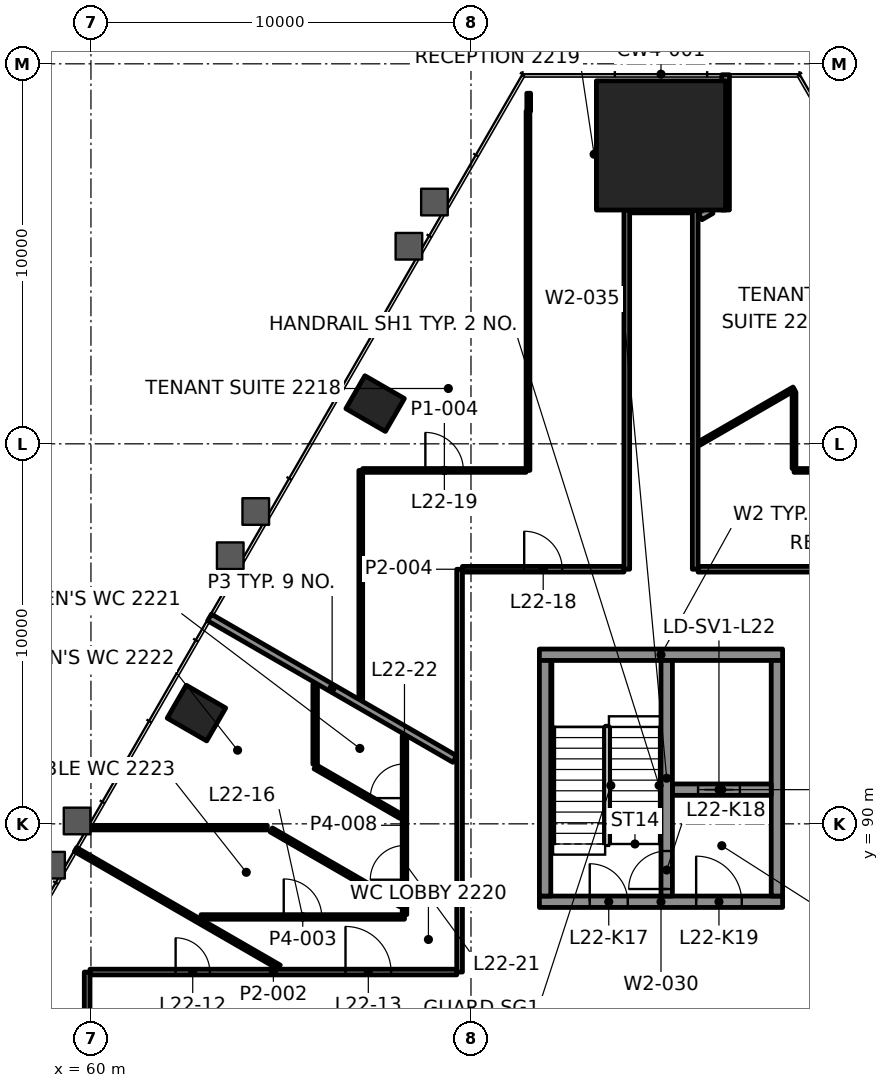
"""IFC4 building model, lengths in metres.
Left out: names, types, materials, properties, quantities, classifications, styles, units other than length and angle.
Written with IfcOpenShell. Run it as: python <this file> out.ifc"""

import sys

from ifc_helpers import new_model, si_unit, direction, frame, frame_2d, origin, origin_2d, place, context, subcontext, project, spatial, rectangle, extrude, element, fill, save


model = new_model("IFC4")
c1 = context("Model", 3, precision=1e-05, world=origin(), true_north=direction((0.0, 1.0)))
c2 = subcontext(c1, "Body", "Model", "MODEL_VIEW")
j1 = project(units=[si_unit("LENGTHUNIT", "METRE"), si_unit("PLANEANGLEUNIT", "RADIAN")], contexts=[c1])
p1 = place(None, origin())
s1 = spatial("IfcSite", under=j1, at=p1, CompositionType="ELEMENT")
p2 = place(p1, origin())
s2 = spatial("IfcBuilding", under=s1, at=p2, CompositionType="ELEMENT")
p3 = place(p2, frame((0.0, 0.0, 98.8)))
s3 = spatial("IfcBuildingStorey", under=s2, at=p3, CompositionType="ELEMENT", Elevation=98.8)
p4 = place(p3, frame((75.0, 107.853, 0.0), z_axis=(0.0, 0.0, 1.0), x_axis=(-1.0, 0.0, 0.0)))
e1 = element("IfcColumn", 1, at=p4, inside=s3, PredefinedType="COLUMN", context=c2, shape_type="SweptSolid", body=[
    extrude(rectangle(XDim=3.4, YDim=3.4, at=origin_2d()), origin(), (0.0, 0.0, 1.0), 4.2),
])
for number, where, z_axis, x_axis in (
    (2, (67.478, 101.059, -0.0), (0.0, 0.0, 1.0), (-0.5, -0.866, 0.0)),
    (3, (62.776, 92.916, -0.0), (0.0, 0.0, 1.0), (-0.5, -0.866, 0.0)),
):
    element("IfcColumn", number, at=place(p3, frame(where, z_axis=z_axis, x_axis=x_axis)), inside=s3, PredefinedType="COLUMN", context=c2, shape_type="SweptSolid", body=[
        extrude(rectangle(XDim=1.0, YDim=1.2, at=origin_2d()), origin(), (0.0, 0.0, 1.0), 4.2),
    ])
p5 = place(p3, frame((71.8, 87.95, 0.0), z_axis=(0.0, 0.0, 1.0), x_axis=(1.0, 0.0, 0.0)))
e4 = element("IfcWall", 4, at=p5, inside=s3, PredefinedType="SHEAR", context=c2, shape_type="SweptSolid", body=[
    extrude(rectangle(XDim=6.4, YDim=0.3, at=frame_2d((3.2, 0.0))), origin(), (0.0, 0.0, 1.0), 4.0),
])
p6 = place(p5, frame((1.325, 0.0, 0.0)))
e5 = element("IfcOpeningElement", 5, at=p6, cuts=e4, PredefinedType="OPENING", context=c2, shape_type="SweptSolid", body=[
    extrude(rectangle(XDim=1.0, YDim=2.1, at=frame_2d((0.5, 1.05))), frame((0.0, 0.16, 0.0), z_axis=(0.0, -1.0, 0.0), x_axis=(1.0, 0.0, 0.0)), (0.0, 0.0, 1.0), 0.32),
])
p7 = place(p5, frame((4.125, 0.0, 0.0)))
e6 = element("IfcOpeningElement", 6, at=p7, cuts=e4, PredefinedType="OPENING", context=c2, shape_type="SweptSolid", body=[
    extrude(rectangle(XDim=1.2, YDim=2.1, at=frame_2d((0.6, 1.05))), frame((0.0, 0.16, 0.0), z_axis=(0.0, -1.0, 0.0), x_axis=(1.0, 0.0, 0.0)), (0.0, 0.0, 1.0), 0.32),
])
p8 = place(p3, frame((71.8, 94.45, 0.0), z_axis=(0.0, 0.0, 1.0), x_axis=(1.0, 0.0, 0.0)))
e7 = element("IfcWall", 7, at=p8, inside=s3, PredefinedType="SHEAR", context=c2, shape_type="SweptSolid", body=[
    extrude(rectangle(XDim=6.4, YDim=0.3, at=frame_2d((3.2, 0.0))), origin(), (0.0, 0.0, 1.0), 4.0),
])
for number, where, z_axis, x_axis in (
    (8, (71.95, 88.1, 0.0), (0.0, 0.0, 1.0), (0.0, 1.0, 0.0)),
    (9, (78.05, 88.1, 0.0), (0.0, 0.0, 1.0), (0.0, 1.0, 0.0)),
):
    element("IfcWall", number, at=place(p3, frame(where, z_axis=z_axis, x_axis=x_axis)), inside=s3, PredefinedType="SHEAR", context=c2, shape_type="SweptSolid", body=[
        extrude(rectangle(XDim=6.2, YDim=0.3, at=frame_2d((3.1, 0.0))), origin(), (0.0, 0.0, 1.0), 4.0),
    ])
p9 = place(p3, frame((75.3, 90.9, 0.0), z_axis=(0.0, 0.0, 1.0), x_axis=(1.0, 0.0, 0.0)))
e10 = element("IfcWall", 10, at=p9, inside=s3, PredefinedType="SHEAR", context=c2, shape_type="SweptSolid", body=[
    extrude(rectangle(XDim=2.6, YDim=0.3, at=frame_2d((1.3, 0.0))), origin(), (0.0, 0.0, 1.0), 4.0),
])
p10 = place(p9, frame((0.675, 0.0, 0.0)))
e11 = element("IfcOpeningElement", 11, at=p10, cuts=e10, PredefinedType="OPENING", context=c2, shape_type="SweptSolid", body=[
    extrude(rectangle(XDim=1.1, YDim=2.1, at=frame_2d((0.55, 1.05))), frame((0.0, 0.16, 0.0), z_axis=(0.0, -1.0, 0.0), x_axis=(1.0, 0.0, 0.0)), (0.0, 0.0, 1.0), 0.32),
])
p11 = place(p3, frame((75.15, 88.1, 0.0), z_axis=(0.0, 0.0, 1.0), x_axis=(0.0, 1.0, 0.0)))
e12 = element("IfcWall", 12, at=p11, inside=s3, PredefinedType="SHEAR", context=c2, shape_type="SweptSolid", body=[
    extrude(rectangle(XDim=6.2, YDim=0.3, at=frame_2d((3.1, 0.0))), origin(), (0.0, 0.0, 1.0), 4.0),
])
p12 = place(p11, frame((0.185, 0.0, 0.0)))
e13 = element("IfcOpeningElement", 13, at=p12, cuts=e12, PredefinedType="OPENING", context=c2, shape_type="SweptSolid", body=[
    extrude(rectangle(XDim=1.0, YDim=2.1, at=frame_2d((0.5, 1.05))), frame((0.0, 0.16, 0.0), z_axis=(0.0, -1.0, 0.0), x_axis=(1.0, 0.0, 0.0)), (0.0, 0.0, 1.0), 0.32),
])
p13 = place(p3, frame((59.976, 86.1, 0.0), z_axis=(0.0, 0.0, 1.0), x_axis=(1.0, 0.0, 0.0)))
e14 = element("IfcWall", 14, at=p13, inside=s3, PredefinedType="PARTITIONING", context=c2, shape_type="SweptSolid", body=[
    extrude(rectangle(XDim=9.649, YDim=0.15, at=frame_2d((4.825, 0.0))), origin(), (0.0, 0.0, 1.0), 3.4),
])
p14 = place(p13, frame((2.252, 0.0, 0.0)))
e15 = element("IfcOpeningElement", 15, at=p14, cuts=e14, PredefinedType="OPENING", context=c2, shape_type="SweptSolid", body=[
    extrude(rectangle(XDim=0.9, YDim=2.1, at=frame_2d((0.45, 1.05))), frame((0.0, 0.085, 0.0), z_axis=(0.0, -1.0, 0.0), x_axis=(1.0, 0.0, 0.0)), (0.0, 0.0, 1.0), 0.17),
])
p15 = place(p13, frame((6.723, 0.0, 0.0)))
e16 = element("IfcOpeningElement", 16, at=p15, cuts=e14, PredefinedType="OPENING", context=c2, shape_type="SweptSolid", body=[
    extrude(rectangle(XDim=1.2, YDim=2.1, at=frame_2d((0.6, 1.05))), frame((0.0, 0.085, 0.0), z_axis=(0.0, -1.0, 0.0), x_axis=(1.0, 0.0, 0.0)), (0.0, 0.0, 1.0), 0.17),
])
p16 = place(p3, frame((62.896, 87.55, 0.0), z_axis=(0.0, 0.0, 1.0), x_axis=(1.0, 0.0, 0.0)))
e17 = element("IfcWall", 17, at=p16, inside=s3, PredefinedType="PARTITIONING", context=c2, shape_type="SweptSolid", body=[
    extrude(rectangle(XDim=5.354, YDim=0.12, at=frame_2d((2.677, 0.0))), origin(), (0.0, 0.0, 1.0), 3.4),
])
p17 = place(p16, frame((2.177, 0.0, 0.0)))
e18 = element("IfcOpeningElement", 18, at=p17, cuts=e17, PredefinedType="OPENING", context=c2, shape_type="SweptSolid", body=[
    extrude(rectangle(XDim=1.0, YDim=2.1, at=frame_2d((0.5, 1.05))), frame((0.0, 0.07, 0.0), z_axis=(0.0, -1.0, 0.0), x_axis=(1.0, 0.0, 0.0)), (0.0, 0.0, 1.0), 0.14),
])
p18 = place(p3, frame((59.927, 89.9, 0.0), z_axis=(0.0, 0.0, 1.0), x_axis=(1.0, 0.0, 0.0)))
e19 = element("IfcWall", 19, at=p18, inside=s3, PredefinedType="PARTITIONING", context=c2, shape_type="SweptSolid", body=[
    extrude(rectangle(XDim=4.714, YDim=0.12, at=frame_2d((2.357, 0.0))), origin(), (0.0, 0.0, 1.0), 3.165),
])
p19 = place(p3, frame((69.775, 96.7, 0.0), z_axis=(0.0, 0.0, 1.0), x_axis=(1.0, 0.0, 0.0)))
e20 = element("IfcWall", 20, at=p19, inside=s3, PredefinedType="PARTITIONING", context=c2, shape_type="SweptSolid", body=[
    extrude(rectangle(XDim=4.25, YDim=0.15, at=frame_2d((2.125, 0.0))), origin(), (0.0, 0.0, 1.0), 3.4),
])
p20 = place(p19, frame((1.625, 0.0, 0.0)))
e21 = element("IfcOpeningElement", 21, at=p20, cuts=e20, PredefinedType="OPENING", context=c2, shape_type="SweptSolid", body=[
    extrude(rectangle(XDim=1.0, YDim=2.1, at=frame_2d((0.5, 1.05))), frame((0.0, 0.085, 0.0), z_axis=(0.0, -1.0, 0.0), x_axis=(1.0, 0.0, 0.0)), (0.0, 0.0, 1.0), 0.17),
])
p21 = place(p3, frame((75.975, 96.7, 0.0), z_axis=(0.0, 0.0, 1.0), x_axis=(1.0, 0.0, 0.0)))
e22 = element("IfcWall", 22, at=p21, inside=s3, PredefinedType="PARTITIONING", context=c2, shape_type="SweptSolid", body=[
    extrude(rectangle(XDim=4.25, YDim=0.15, at=frame_2d((2.125, 0.0))), origin(), (0.0, 0.0, 1.0), 3.4),
])
p22 = place(p3, frame((67.15, 99.3, 0.0), z_axis=(0.0, 0.0, 1.0), x_axis=(1.0, 0.0, 0.0)))
e23 = element("IfcWall", 23, at=p22, inside=s3, PredefinedType="PARTITIONING", context=c2, shape_type="SweptSolid", body=[
    extrude(rectangle(XDim=4.3, YDim=0.1, at=frame_2d((2.15, 0.0))), origin(), (0.0, 0.0, 1.0), 3.4),
])
p23 = place(p22, frame((1.65, 0.0, 0.0)))
e24 = element("IfcOpeningElement", 24, at=p23, cuts=e23, PredefinedType="OPENING", context=c2, shape_type="SweptSolid", body=[
    extrude(rectangle(XDim=1.0, YDim=2.1, at=frame_2d((0.5, 1.05))), frame((0.0, 0.06, 0.0), z_axis=(0.0, -1.0, 0.0), x_axis=(1.0, 0.0, 0.0)), (0.0, 0.0, 1.0), 0.12),
])
p24 = place(p3, frame((78.5, 99.3, 0.0), z_axis=(0.0, 0.0, 1.0), x_axis=(1.0, 0.0, 0.0)))
e25 = element("IfcWall", 25, at=p24, inside=s3, PredefinedType="PARTITIONING", context=c2, shape_type="SweptSolid", body=[
    extrude(rectangle(XDim=4.35, YDim=0.1, at=frame_2d((2.175, 0.0))), origin(), (0.0, 0.0, 1.0), 3.4),
])
p25 = place(p3, frame((74.176, 106.153, 0.0), z_axis=(0.0, 0.0, 1.0), x_axis=(1.0, 0.0, 0.0)))
e26 = element("IfcWall", 26, at=p25, inside=s3, PredefinedType="PARTITIONING", context=c2, shape_type="SweptSolid", body=[
    extrude(rectangle(XDim=1.649, YDim=0.15, at=frame_2d((0.824, 0.0))), origin(), (0.0, 0.0, 1.0), 3.397),
])
p26 = place(p3, frame((76.001, 100.008, 0.0), z_axis=(0.0, 0.0, 1.0), x_axis=(0.866016514357, 0.500015396624, 0.0)))
e27 = element("IfcWall", 27, at=p26, inside=s3, PredefinedType="PARTITIONING", context=c2, shape_type="SweptSolid", body=[
    extrude(rectangle(XDim=2.886, YDim=0.1, at=frame_2d((1.443, 0.0))), origin(), (0.0, 0.0, 1.0), 3.4),
])
p27 = place(p3, frame((76.028, 105.984, 0.0), z_axis=(0.0, 0.0, 1.0), x_axis=(0.866137275136, 0.499806183056, 0.0)))
e28 = element("IfcWall", 28, at=p27, inside=s3, PredefinedType="PARTITIONING", context=c2, shape_type="SweptSolid", body=[
    extrude(rectangle(XDim=0.337, YDim=0.2, at=frame_2d((0.168, 0.0))), origin(), (0.0, 0.0, 1.0), 3.4),
])
p28 = place(p3, frame((78.5, 99.35, 0.0), z_axis=(0.0, 0.0, 1.0), x_axis=(0.0, 1.0, 0.0)))
e29 = element("IfcWall", 29, at=p28, inside=s3, PredefinedType="PARTITIONING", context=c2, shape_type="SweptSolid", body=[
    extrude(rectangle(XDim=2.014, YDim=0.1, at=frame_2d((1.007, 0.0))), origin(), (0.0, 0.0, 1.0), 3.4),
])
p29 = place(p3, frame((76.7, 106.153, 0.0), z_axis=(0.0, 0.0, 1.0), x_axis=(0.0, 1.0, 0.0)))
e30 = element("IfcWall", 30, at=p29, inside=s3, PredefinedType="PARTITIONING", context=c2, shape_type="SweptSolid", body=[
    extrude(rectangle(XDim=3.559, YDim=0.2, at=frame_2d((1.78, 0.0))), origin(), (0.0, 0.0, 1.0), 3.4),
])
for number, where, z_axis, x_axis in (
    (31, (75.9, 96.7, 0.0), (0.0, 0.0, 1.0), (0.0, 1.0, 0.0)),
    (32, (74.1, 96.7, 0.0), (0.0, 0.0, 1.0), (0.0, 1.0, 0.0)),
):
    element("IfcWall", number, at=place(p3, frame(where, z_axis=z_axis, x_axis=x_axis)), inside=s3, PredefinedType="PARTITIONING", context=c2, shape_type="SweptSolid", body=[
        extrude(rectangle(XDim=9.452, YDim=0.15, at=frame_2d((4.726, 0.0))), origin(), (0.0, 0.0, 1.0), 3.4),
    ])
p30 = place(p3, frame((71.519, 108.753, 0.0), z_axis=(0.0, 0.0, 1.0), x_axis=(0.0, 1.0, 0.0)))
e33 = element("IfcWall", 33, at=p30, inside=s3, PredefinedType="PARTITIONING", context=c2, shape_type="SweptSolid", body=[
    extrude(rectangle(XDim=0.473, YDim=0.1, at=frame_2d((0.236, 0.0))), origin(), (0.0, 0.0, 1.0), 3.4),
])
p31 = place(p3, frame((71.5, 99.301, 0.0), z_axis=(0.0, 0.0, 1.0), x_axis=(0.0, 1.0, 0.0)))
e34 = element("IfcWall", 34, at=p31, inside=s3, PredefinedType="PARTITIONING", context=c2, shape_type="SweptSolid", body=[
    extrude(rectangle(XDim=9.452, YDim=0.1, at=frame_2d((4.726, 0.0))), origin(), (0.0, 0.0, 1.0), 3.4),
])
p32 = place(p3, frame((69.7, 86.1, 0.0), z_axis=(0.0, 0.0, 1.0), x_axis=(0.0, 1.0, 0.0)))
e35 = element("IfcWall", 35, at=p32, inside=s3, PredefinedType="PARTITIONING", context=c2, shape_type="SweptSolid", body=[
    extrude(rectangle(XDim=10.599, YDim=0.15, at=frame_2d((5.3, 0.0))), origin(), (0.0, 0.0, 1.0), 3.322),
])
p33 = place(p3, frame((68.25, 87.61, 0.0), z_axis=(0.0, 0.0, 1.0), x_axis=(0.0, 1.0, 0.0)))
e36 = element("IfcWall", 36, at=p33, inside=s3, PredefinedType="PARTITIONING", context=c2, shape_type="SweptSolid", body=[
    extrude(rectangle(XDim=4.704, YDim=0.12, at=frame_2d((2.352, 0.0))), origin(), (0.0, 0.0, 1.0), 3.322),
])
p34 = place(p33, frame((0.92, 0.0, 0.0)))
e37 = element("IfcOpeningElement", 37, at=p34, cuts=e36, PredefinedType="OPENING", context=c2, shape_type="SweptSolid", body=[
    extrude(rectangle(XDim=0.9, YDim=2.1, at=frame_2d((0.45, 1.05))), frame((0.0, 0.07, 0.0), z_axis=(0.0, -1.0, 0.0), x_axis=(1.0, 0.0, 0.0)), (0.0, 0.0, 1.0), 0.14),
])
p35 = place(p33, frame((3.067, 0.0, 0.0)))
e38 = element("IfcOpeningElement", 38, at=p35, cuts=e36, PredefinedType="OPENING", context=c2, shape_type="SweptSolid", body=[
    extrude(rectangle(XDim=0.9, YDim=2.1, at=frame_2d((0.45, 1.05))), frame((0.0, 0.07, 0.0), z_axis=(0.0, -1.0, 0.0), x_axis=(1.0, 0.0, 0.0)), (0.0, 0.0, 1.0), 0.14),
])
p36 = place(p3, frame((67.1, 93.279, 0.0), z_axis=(0.0, 0.0, 1.0), x_axis=(0.0, 1.0, 0.0)))
e39 = element("IfcWall", 39, at=p36, inside=s3, PredefinedType="PARTITIONING", context=c2, shape_type="SweptSolid", body=[
    extrude(rectangle(XDim=6.021, YDim=0.1, at=frame_2d((3.01, 0.0))), origin(), (0.0, 0.0, 1.0), 3.4),
])
p37 = place(p3, frame((65.9, 91.569, 0.0), z_axis=(0.0, 0.0, 1.0), x_axis=(0.0, 1.0, 0.0)))
e40 = element("IfcWall", 40, at=p37, inside=s3, PredefinedType="PARTITIONING", context=c2, shape_type="SweptSolid", body=[
    extrude(rectangle(XDim=2.101, YDim=0.12, at=frame_2d((1.051, 0.0))), origin(), (0.0, 0.0, 1.0), 3.4),
])
p38 = place(p3, frame((59.9, 67.321, 0.0), z_axis=(0.0, 0.0, 1.0), x_axis=(0.0, 1.0, 0.0)))
e41 = element("IfcWall", 41, at=p38, inside=s3, PredefinedType="PARTITIONING", context=c2, shape_type="SweptSolid", body=[
    extrude(rectangle(XDim=18.778, YDim=0.15, at=frame_2d((9.389, 0.0))), origin(), (0.0, 0.0, 1.0), 3.4),
])
p39 = place(p3, frame((69.573, 91.706, 0.0), z_axis=(0.0, 0.0, 1.0), x_axis=(-0.866024622953, 0.500001352437, 0.0)))
e42 = element("IfcWall", 42, at=p39, inside=s3, PredefinedType="PARTITIONING", context=c2, shape_type="SweptSolid", body=[
    extrude(rectangle(XDim=7.451, YDim=0.2, at=frame_2d((3.726, 0.0))), origin(), (0.0, 0.0, 1.0), 3.165),
])
p40 = place(p3, frame((68.155, 90.198, 0.0), z_axis=(0.0, 0.0, 1.0), x_axis=(-0.866024771944, 0.500001094379, 0.0)))
e43 = element("IfcWall", 43, at=p40, inside=s3, PredefinedType="PARTITIONING", context=c2, shape_type="SweptSolid", body=[
    extrude(rectangle(XDim=2.604, YDim=0.12, at=frame_2d((1.302, 0.0))), origin(), (0.0, 0.0, 1.0), 3.4),
])
p41 = place(p3, frame((68.155, 87.871, 0.0), z_axis=(0.0, 0.0, 1.0), x_axis=(-0.866041060244, 0.499972881236, 0.0)))
e44 = element("IfcWall", 44, at=p41, inside=s3, PredefinedType="PARTITIONING", context=c2, shape_type="SweptSolid", body=[
    extrude(rectangle(XDim=3.938, YDim=0.12, at=frame_2d((1.969, 0.0))), origin(), (0.0, 0.0, 1.0), 3.4),
])
p42 = place(p3, frame((64.953, 86.23, 0.0), z_axis=(0.0, 0.0, 1.0), x_axis=(-0.866029863972, 0.499992274648, 0.0)))
e45 = element("IfcWall", 45, at=p42, inside=s3, PredefinedType="PARTITIONING", context=c2, shape_type="SweptSolid", body=[
    extrude(rectangle(XDim=6.188, YDim=0.12, at=frame_2d((3.094, 0.0))), origin(), (0.0, 0.0, 1.0), 3.165),
])
p43 = place(p14, origin())
e46 = element("IfcDoor", 46, at=p43, inside=s3, OperationType="SINGLE_SWING_LEFT", PredefinedType="DOOR", context=c2, shape_type="SweptSolid", body=[
    extrude(rectangle(XDim=0.9, YDim=2.1, at=frame_2d((0.45, 1.05))), frame((0.0, 0.025, 0.0), z_axis=(0.0, -1.0, 0.0), x_axis=(1.0, 0.0, 0.0)), (0.0, 0.0, 1.0), 0.05),
])
fill(e15, e46)
p44 = place(p15, origin())
e47 = element("IfcDoor", 47, at=p44, inside=s3, OperationType="DOUBLE_DOOR_SINGLE_SWING", PredefinedType="DOOR", context=c2, shape_type="SweptSolid", body=[
    extrude(rectangle(XDim=1.2, YDim=2.1, at=frame_2d((0.6, 1.05))), frame((0.0, 0.025, 0.0), z_axis=(0.0, -1.0, 0.0), x_axis=(1.0, 0.0, 0.0)), (0.0, 0.0, 1.0), 0.05),
])
fill(e16, e47)
p45 = place(p17, origin())
e48 = element("IfcDoor", 48, at=p45, inside=s3, OperationType="SINGLE_SWING_RIGHT", PredefinedType="DOOR", context=c2, shape_type="SweptSolid", body=[
    extrude(rectangle(XDim=1.0, YDim=2.1, at=frame_2d((0.5, 1.05))), frame((0.0, 0.025, 0.0), z_axis=(0.0, -1.0, 0.0), x_axis=(1.0, 0.0, 0.0)), (0.0, 0.0, 1.0), 0.05),
])
fill(e18, e48)
p46 = place(p20, origin())
e49 = element("IfcDoor", 49, at=p46, inside=s3, OperationType="SINGLE_SWING_RIGHT", PredefinedType="DOOR", context=c2, shape_type="SweptSolid", body=[
    extrude(rectangle(XDim=1.0, YDim=2.1, at=frame_2d((0.5, 1.05))), frame((0.0, 0.025, 0.0), z_axis=(0.0, -1.0, 0.0), x_axis=(1.0, 0.0, 0.0)), (0.0, 0.0, 1.0), 0.05),
])
fill(e21, e49)
p47 = place(p23, origin())
e50 = element("IfcDoor", 50, at=p47, inside=s3, OperationType="SINGLE_SWING_LEFT", PredefinedType="DOOR", context=c2, shape_type="SweptSolid", body=[
    extrude(rectangle(XDim=1.0, YDim=2.1, at=frame_2d((0.5, 1.05))), frame((0.0, 0.025, 0.0), z_axis=(0.0, -1.0, 0.0), x_axis=(1.0, 0.0, 0.0)), (0.0, 0.0, 1.0), 0.05),
])
fill(e24, e50)
p48 = place(p34, origin())
e51 = element("IfcDoor", 51, at=p48, inside=s3, OperationType="SINGLE_SWING_LEFT", PredefinedType="DOOR", context=c2, shape_type="SweptSolid", body=[
    extrude(rectangle(XDim=0.9, YDim=2.1, at=frame_2d((0.45, 1.05))), frame((0.0, 0.025, 0.0), z_axis=(0.0, -1.0, 0.0), x_axis=(1.0, 0.0, 0.0)), (0.0, 0.0, 1.0), 0.05),
])
fill(e37, e51)
p49 = place(p35, origin())
e52 = element("IfcDoor", 52, at=p49, inside=s3, OperationType="SINGLE_SWING_RIGHT", PredefinedType="DOOR", context=c2, shape_type="SweptSolid", body=[
    extrude(rectangle(XDim=0.9, YDim=2.1, at=frame_2d((0.45, 1.05))), frame((0.0, 0.025, 0.0), z_axis=(0.0, -1.0, 0.0), x_axis=(1.0, 0.0, 0.0)), (0.0, 0.0, 1.0), 0.05),
])
fill(e38, e52)
p50 = place(p10, origin())
e53 = element("IfcDoor", 53, at=p50, inside=s3, OperationType="DOUBLE_DOOR_SLIDING", PredefinedType="DOOR", context=c2, shape_type="SweptSolid", body=[
    extrude(rectangle(XDim=1.1, YDim=2.1, at=frame_2d((0.55, 1.05))), frame((0.0, 0.025, 0.0), z_axis=(0.0, -1.0, 0.0), x_axis=(1.0, 0.0, 0.0)), (0.0, 0.0, 1.0), 0.05),
])
fill(e11, e53)
p51 = place(p6, origin())
e54 = element("IfcDoor", 54, at=p51, inside=s3, OperationType="SINGLE_SWING_RIGHT", PredefinedType="DOOR", context=c2, shape_type="SweptSolid", body=[
    extrude(rectangle(XDim=1.0, YDim=2.1, at=frame_2d((0.5, 1.05))), frame((0.0, 0.025, 0.0), z_axis=(0.0, -1.0, 0.0), x_axis=(1.0, 0.0, 0.0)), (0.0, 0.0, 1.0), 0.05),
])
fill(e5, e54)
p52 = place(p12, origin())
e55 = element("IfcDoor", 55, at=p52, inside=s3, OperationType="SINGLE_SWING_LEFT", PredefinedType="DOOR", context=c2, shape_type="SweptSolid", body=[
    extrude(rectangle(XDim=1.0, YDim=2.1, at=frame_2d((0.5, 1.05))), frame((0.0, 0.025, 0.0), z_axis=(0.0, -1.0, 0.0), x_axis=(1.0, 0.0, 0.0)), (0.0, 0.0, 1.0), 0.05),
])
fill(e13, e55)
p53 = place(p7, origin())
e56 = element("IfcDoor", 56, at=p53, inside=s3, OperationType="SINGLE_SWING_RIGHT", PredefinedType="DOOR", context=c2, shape_type="SweptSolid", body=[
    extrude(rectangle(XDim=1.2, YDim=2.1, at=frame_2d((0.6, 1.05))), frame((0.0, 0.025, 0.0), z_axis=(0.0, -1.0, 0.0), x_axis=(1.0, 0.0, 0.0)), (0.0, 0.0, 1.0), 0.05),
])
fill(e6, e56)
save(model, sys.argv[1])
